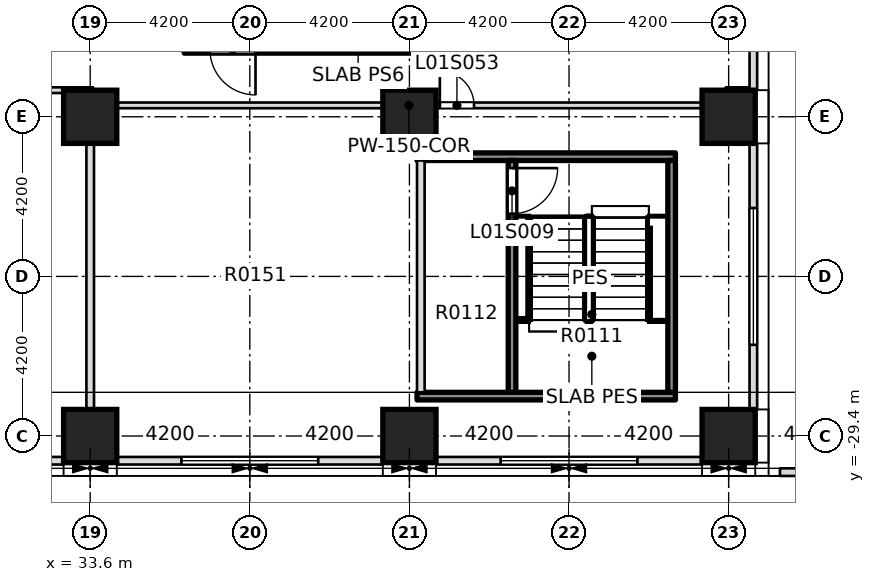
"""IFC4 building model, lengths in metres.
Left out: names, types, materials, properties, quantities, classifications, styles, units other than length and angle.
Written with IfcOpenShell. Run it as: python <this file> out.ifc"""

import sys

from ifc_helpers import new_model, si_unit, direction, frame, frame_2d, origin, origin_2d, place, context, subcontext, project, spatial, rectangle, extrude, element, fill, save


model = new_model("IFC4")
c1 = context("Model", 3, precision=1e-05, world=origin(), true_north=direction((0.0, 1.0)))
c2 = subcontext(c1, "Body", "Model", "MODEL_VIEW")
j1 = project(units=[si_unit("LENGTHUNIT", "METRE"), si_unit("PLANEANGLEUNIT", "RADIAN")], contexts=[c1])
p1 = place(None, origin())
s1 = spatial("IfcSite", under=j1, at=p1, CompositionType="ELEMENT")
p2 = place(p1, origin())
s2 = spatial("IfcBuilding", under=s1, at=p2, CompositionType="ELEMENT")
p3 = place(p2, frame((0.0, 0.0, 7.5)))
s3 = spatial("IfcBuildingStorey", under=s2, at=p3, CompositionType="ELEMENT", Elevation=7.5)
for number, where, z_axis, x_axis in (
    (1, (33.6, -29.4, 0.0), (0.0, 0.0, 1.0), (1.0, 0.0, 0.0)),
    (2, (42.0, -29.4, 0.0), (0.0, 0.0, 1.0), (1.0, 0.0, 0.0)),
):
    element("IfcColumn", number, at=place(p3, frame(where, z_axis=z_axis, x_axis=x_axis)), inside=s3, PredefinedType="COLUMN", context=c2, shape_type="SweptSolid", body=[
        extrude(rectangle(XDim=1.4, YDim=1.4, at=origin_2d()), origin(), (0.0, 0.0, 1.0), 4.6),
    ])
p4 = place(p3, frame((50.4, -29.4, 0.0), z_axis=(0.0, 0.0, 1.0), x_axis=(1.0, 0.0, 0.0)))
e3 = element("IfcColumn", 3, at=p4, inside=s3, PredefinedType="COLUMN", context=c2, shape_type="SweptSolid", body=[
    extrude(rectangle(XDim=1.4, YDim=1.4, at=origin_2d()), origin(), (0.0, 0.0, 1.0), 5.0),
])
for number, where, z_axis, x_axis in (
    (4, (33.6, -21.0, 0.0), (0.0, 0.0, 1.0), (1.0, 0.0, 0.0)),
    (5, (42.0, -21.0, 0.0), (0.0, 0.0, 1.0), (1.0, 0.0, 0.0)),
):
    element("IfcColumn", number, at=place(p3, frame(where, z_axis=z_axis, x_axis=x_axis)), inside=s3, PredefinedType="COLUMN", context=c2, shape_type="SweptSolid", body=[
        extrude(rectangle(XDim=1.4, YDim=1.4, at=origin_2d()), origin(), (0.0, 0.0, 1.0), 4.6),
    ])
p5 = place(p3, frame((50.4, -21.0, 0.0), z_axis=(0.0, 0.0, 1.0), x_axis=(1.0, 0.0, 0.0)))
e6 = element("IfcColumn", 6, at=p5, inside=s3, PredefinedType="COLUMN", context=c2, shape_type="SweptSolid", body=[
    extrude(rectangle(XDim=1.4, YDim=1.4, at=origin_2d()), origin(), (0.0, 0.0, 1.0), 5.0),
])
p6 = place(p3, frame((51.75, -30.35, 5.0), z_axis=(0.0, 0.0, 1.0), x_axis=(1.0, 0.0, 0.0)))
e7 = element("IfcWall", 7, at=p6, inside=s3, PredefinedType="PARAPET", context=c2, shape_type="SweptSolid", body=[
    extrude(rectangle(XDim=7.75, YDim=0.2, at=frame_2d((3.875, 0.0))), origin(), (0.0, 0.0, 1.0), 1.2),
])
for number, where, z_axis, x_axis in (
    (8, (42.2, -28.35, 0.0), (0.0, 0.0, 1.0), (1.0, 0.0, 0.0)),
    (9, (42.2, -22.05, 0.0), (0.0, 0.0, 1.0), (1.0, 0.0, 0.0)),
):
    element("IfcWall", number, at=place(p3, frame(where, z_axis=z_axis, x_axis=x_axis)), inside=s3, PredefinedType="SOLIDWALL", context=c2, shape_type="SweptSolid", body=[
        extrude(rectangle(XDim=6.8, YDim=0.2, at=frame_2d((3.4, 0.0))), origin(), (0.0, 0.0, 1.0), 4.6),
    ])
p7 = place(p3, frame((33.5, -20.7, 0.0), z_axis=(0.0, 0.0, 1.0), x_axis=(1.0, 0.0, 0.0)))
e10 = element("IfcWall", 10, at=p7, inside=s3, PredefinedType="PARTITIONING", context=c2, shape_type="SweptSolid", body=[
    extrude(rectangle(XDim=16.975, YDim=0.15, at=frame_2d((8.488, 0.0))), origin(), (0.0, 0.0, 1.0), 4.6),
])
p8 = place(p7, frame((9.3, 0.0, 0.0)))
e11 = element("IfcOpeningElement", 11, at=p8, cuts=e10, PredefinedType="OPENING", context=c2, shape_type="SweptSolid", body=[
    extrude(rectangle(XDim=0.9, YDim=2.1, at=frame_2d((0.45, 1.05))), frame((0.0, 0.085, 0.0), z_axis=(0.0, -1.0, 0.0), x_axis=(1.0, 0.0, 0.0)), (0.0, 0.0, 1.0), 0.17),
])
p9 = place(p3, frame((-34.15, -20.3, 0.0), z_axis=(0.0, 0.0, 1.0), x_axis=(1.0, 0.0, 0.0)))
e12 = element("IfcWall", 12, at=p9, inside=s3, PredefinedType="PARTITIONING", context=c2, shape_type="SweptSolid", body=[
    extrude(rectangle(XDim=67.825, YDim=0.15, at=frame_2d((33.913, 0.0))), origin(), (0.0, 0.0, 1.0), 4.6),
])
p10 = place(p9, frame((12.6, 0.0, 0.0)))
e13 = element("IfcOpeningElement", 13, at=p10, cuts=e12, PredefinedType="OPENING", context=c2, shape_type="SweptSolid", body=[
    extrude(rectangle(XDim=1.1, YDim=2.1, at=frame_2d((0.55, 1.05))), frame((0.0, 0.085, 0.0), z_axis=(0.0, -1.0, 0.0), x_axis=(1.0, 0.0, 0.0)), (0.0, 0.0, 1.0), 0.17),
])
p11 = place(p9, frame((4.025, 0.0, 0.0)))
e14 = element("IfcOpeningElement", 14, at=p11, cuts=e12, PredefinedType="OPENING", context=c2, shape_type="SweptSolid", body=[
    extrude(rectangle(XDim=0.9, YDim=2.1, at=frame_2d((0.45, 1.05))), frame((0.0, 0.085, 0.0), z_axis=(0.0, -1.0, 0.0), x_axis=(1.0, 0.0, 0.0)), (0.0, 0.0, 1.0), 0.17),
])
p12 = place(p9, frame((26.5, 0.0, 0.0)))
e15 = element("IfcOpeningElement", 15, at=p12, cuts=e12, PredefinedType="OPENING", context=c2, shape_type="SweptSolid", body=[
    extrude(rectangle(XDim=0.9, YDim=2.1, at=frame_2d((0.45, 1.05))), frame((0.0, 0.085, 0.0), z_axis=(0.0, -1.0, 0.0), x_axis=(1.0, 0.0, 0.0)), (0.0, 0.0, 1.0), 0.17),
])
p13 = place(p9, frame((40.85, 0.0, 0.0)))
e16 = element("IfcOpeningElement", 16, at=p13, cuts=e12, PredefinedType="OPENING", context=c2, shape_type="SweptSolid", body=[
    extrude(rectangle(XDim=0.9, YDim=2.1, at=frame_2d((0.45, 1.05))), frame((0.0, 0.085, 0.0), z_axis=(0.0, -1.0, 0.0), x_axis=(1.0, 0.0, 0.0)), (0.0, 0.0, 1.0), 0.17),
])
p14 = place(p9, frame((54.6, 0.0, 0.0)))
e17 = element("IfcOpeningElement", 17, at=p14, cuts=e12, PredefinedType="OPENING", context=c2, shape_type="SweptSolid", body=[
    extrude(rectangle(XDim=1.1, YDim=2.1, at=frame_2d((0.55, 1.05))), frame((0.0, 0.085, 0.0), z_axis=(0.0, -1.0, 0.0), x_axis=(1.0, 0.0, 0.0)), (0.0, 0.0, 1.0), 0.17),
])
p15 = place(p9, frame((63.1, 0.0, 0.0)))
e18 = element("IfcOpeningElement", 18, at=p15, cuts=e12, PredefinedType="OPENING", context=c2, shape_type="SweptSolid", body=[
    extrude(rectangle(XDim=0.9, YDim=2.1, at=frame_2d((0.45, 1.05))), frame((0.0, 0.085, 0.0), z_axis=(0.0, -1.0, 0.0), x_axis=(1.0, 0.0, 0.0)), (0.0, 0.0, 1.0), 0.17),
])
p16 = place(p3, frame((50.325, -20.3, 0.0), z_axis=(0.0, 0.0, 1.0), x_axis=(1.0, 0.0, 0.0)))
e19 = element("IfcWall", 19, at=p16, inside=s3, PredefinedType="PARTITIONING", context=c2, shape_type="SweptSolid", body=[
    extrude(rectangle(XDim=0.625, YDim=0.15, at=frame_2d((0.312, 0.0))), origin(), (0.0, 0.0, 1.0), 4.6),
])
p17 = place(p3, frame((36.075, -19.225, 0.0), z_axis=(0.0, 0.0, 1.0), x_axis=(1.0, 0.0, 0.0)))
e20 = element("IfcWall", 20, at=p17, inside=s3, PredefinedType="SOLIDWALL", context=c2, shape_type="SweptSolid", body=[
    extrude(rectangle(XDim=6.75, YDim=0.2, at=frame_2d((3.375, 0.0))), origin(), (0.0, 0.0, 1.0), 4.6),
])
p18 = place(p17, frame((0.675, 0.0, 0.0)))
e21 = element("IfcOpeningElement", 21, at=p18, cuts=e20, PredefinedType="OPENING", context=c2, shape_type="SweptSolid", body=[
    extrude(rectangle(XDim=1.2, YDim=2.1, at=frame_2d((0.6, 1.05))), frame((0.0, 0.11, 0.0), z_axis=(0.0, -1.0, 0.0), x_axis=(1.0, 0.0, 0.0)), (0.0, 0.0, 1.0), 0.22),
])
p19 = place(p3, frame((33.6, -29.95, 0.0), z_axis=(0.0, 0.0, 1.0), x_axis=(0.0, 1.0, 0.0)))
e22 = element("IfcWall", 22, at=p19, inside=s3, PredefinedType="PARTITIONING", context=c2, shape_type="SweptSolid", body=[
    extrude(rectangle(XDim=9.175, YDim=0.2, at=frame_2d((4.587, 0.0))), origin(), (0.0, 0.0, 1.0), 4.6),
])
p20 = place(p3, frame((33.6, -20.625, 0.0), z_axis=(0.0, 0.0, 1.0), x_axis=(0.0, 1.0, 0.0)))
e23 = element("IfcWall", 23, at=p20, inside=s3, PredefinedType="PARTITIONING", context=c2, shape_type="SweptSolid", body=[
    extrude(rectangle(XDim=0.25, YDim=0.15, at=frame_2d((0.125, 0.0))), origin(), (0.0, 0.0, 1.0), 4.6),
])
p21 = place(p3, frame((42.3, -28.25, 0.0), z_axis=(0.0, 0.0, 1.0), x_axis=(0.0, 1.0, 0.0)))
e24 = element("IfcWall", 24, at=p21, inside=s3, PredefinedType="PARTITIONING", context=c2, shape_type="SweptSolid", body=[
    extrude(rectangle(XDim=6.1, YDim=0.2, at=frame_2d((3.05, 0.0))), origin(), (0.0, 0.0, 1.0), 4.6),
])
p22 = place(p3, frame((44.7, -28.25, 0.0), z_axis=(0.0, 0.0, 1.0), x_axis=(0.0, 1.0, 0.0)))
e25 = element("IfcWall", 25, at=p22, inside=s3, PredefinedType="SOLIDWALL", context=c2, shape_type="SweptSolid", body=[
    extrude(rectangle(XDim=6.1, YDim=0.2, at=frame_2d((3.05, 0.0))), origin(), (0.0, 0.0, 1.0), 4.6),
])
p23 = place(p22, frame((4.7, 0.0, 0.0)))
e26 = element("IfcOpeningElement", 26, at=p23, cuts=e25, PredefinedType="OPENING", context=c2, shape_type="SweptSolid", body=[
    extrude(rectangle(XDim=1.2, YDim=2.1, at=frame_2d((0.6, 1.05))), frame((0.0, 0.11, 0.0), z_axis=(0.0, -1.0, 0.0), x_axis=(1.0, 0.0, 0.0)), (0.0, 0.0, 1.0), 0.22),
])
p24 = place(p3, frame((48.9, -28.25, 0.0), z_axis=(0.0, 0.0, 1.0), x_axis=(0.0, 1.0, 0.0)))
e27 = element("IfcWall", 27, at=p24, inside=s3, PredefinedType="SOLIDWALL", context=c2, shape_type="SweptSolid", body=[
    extrude(rectangle(XDim=6.1, YDim=0.2, at=frame_2d((3.05, 0.0))), origin(), (0.0, 0.0, 1.0), 4.6),
])
p25 = place(p3, frame((50.4, -20.625, 0.0), z_axis=(0.0, 0.0, 1.0), x_axis=(0.0, 1.0, 0.0)))
e28 = element("IfcWall", 28, at=p25, inside=s3, PredefinedType="PARTITIONING", context=c2, shape_type="SweptSolid", body=[
    extrude(rectangle(XDim=0.25, YDim=0.15, at=frame_2d((0.125, 0.0))), origin(), (0.0, 0.0, 1.0), 4.6),
])
p26 = place(p3, frame((25.9, -30.05, 0.0), z_axis=(0.0, 0.0, 1.0), x_axis=(1.0, 0.0, 0.0)))
e29 = element("IfcWall", 29, at=p26, inside=s3, PredefinedType="STANDARD", context=c2, shape_type="SweptSolid", body=[
    extrude(rectangle(XDim=7.0, YDim=0.2, at=frame_2d((3.5, 0.0))), origin(), (0.0, 0.0, 1.0), 4.6),
])
p27 = place(p26, frame((1.7, 0.0, 0.9)))
e30 = element("IfcOpeningElement", 30, at=p27, cuts=e29, PredefinedType="OPENING", context=c2, shape_type="SweptSolid", body=[
    extrude(rectangle(XDim=3.6, YDim=2.8, at=frame_2d((1.8, 1.4))), frame((0.0, 0.11, 0.0), z_axis=(0.0, -1.0, 0.0), x_axis=(1.0, 0.0, 0.0)), (0.0, 0.0, 1.0), 0.22),
])
p28 = place(p3, frame((34.3, -30.05, 0.0), z_axis=(0.0, 0.0, 1.0), x_axis=(1.0, 0.0, 0.0)))
e31 = element("IfcWall", 31, at=p28, inside=s3, PredefinedType="STANDARD", context=c2, shape_type="SweptSolid", body=[
    extrude(rectangle(XDim=7.0, YDim=0.2, at=frame_2d((3.5, 0.0))), origin(), (0.0, 0.0, 1.0), 4.6),
])
p29 = place(p28, frame((1.7, 0.0, 0.9)))
e32 = element("IfcOpeningElement", 32, at=p29, cuts=e31, PredefinedType="OPENING", context=c2, shape_type="SweptSolid", body=[
    extrude(rectangle(XDim=3.6, YDim=2.8, at=frame_2d((1.8, 1.4))), frame((0.0, 0.11, 0.0), z_axis=(0.0, -1.0, 0.0), x_axis=(1.0, 0.0, 0.0)), (0.0, 0.0, 1.0), 0.22),
])
p30 = place(p3, frame((42.7, -30.05, 0.0), z_axis=(0.0, 0.0, 1.0), x_axis=(1.0, 0.0, 0.0)))
e33 = element("IfcWall", 33, at=p30, inside=s3, PredefinedType="STANDARD", context=c2, shape_type="SweptSolid", body=[
    extrude(rectangle(XDim=7.0, YDim=0.2, at=frame_2d((3.5, 0.0))), origin(), (0.0, 0.0, 1.0), 4.6),
])
p31 = place(p30, frame((1.7, 0.0, 0.9)))
e34 = element("IfcOpeningElement", 34, at=p31, cuts=e33, PredefinedType="OPENING", context=c2, shape_type="SweptSolid", body=[
    extrude(rectangle(XDim=3.6, YDim=2.8, at=frame_2d((1.8, 1.4))), frame((0.0, 0.11, 0.0), z_axis=(0.0, -1.0, 0.0), x_axis=(1.0, 0.0, 0.0)), (0.0, 0.0, 1.0), 0.22),
])
p32 = place(p3, frame((51.05, -28.7, 0.0), z_axis=(0.0, 0.0, 1.0), x_axis=(0.0, 1.0, 0.0)))
e35 = element("IfcWall", 35, at=p32, inside=s3, PredefinedType="STANDARD", context=c2, shape_type="SweptSolid", body=[
    extrude(rectangle(XDim=7.0, YDim=0.2, at=frame_2d((3.5, 0.0))), origin(), (0.0, 0.0, 1.0), 4.6),
])
p33 = place(p32, frame((1.7, 0.0, 0.9)))
e36 = element("IfcOpeningElement", 36, at=p33, cuts=e35, PredefinedType="OPENING", context=c2, shape_type="SweptSolid", body=[
    extrude(rectangle(XDim=3.6, YDim=2.8, at=frame_2d((1.8, 1.4))), frame((0.0, 0.11, 0.0), z_axis=(0.0, -1.0, 0.0), x_axis=(1.0, 0.0, 0.0)), (0.0, 0.0, 1.0), 0.22),
])
p34 = place(p3, frame((51.05, -20.3, 0.0), z_axis=(0.0, 0.0, 1.0), x_axis=(0.0, 1.0, 0.0)))
e37 = element("IfcWall", 37, at=p34, inside=s3, PredefinedType="STANDARD", context=c2, shape_type="SweptSolid", body=[
    extrude(rectangle(XDim=7.0, YDim=0.2, at=frame_2d((3.5, 0.0))), origin(), (0.0, 0.0, 1.0), 4.6),
])
p35 = place(p34, frame((2.32, 0.0, 0.9)))
e38 = element("IfcOpeningElement", 38, at=p35, cuts=e37, PredefinedType="OPENING", context=c2, shape_type="SweptSolid", body=[
    extrude(rectangle(XDim=3.6, YDim=2.8, at=frame_2d((1.8, 1.4))), frame((0.0, 0.11, 0.0), z_axis=(0.0, -1.0, 0.0), x_axis=(1.0, 0.0, 0.0)), (0.0, 0.0, 1.0), 0.22),
])
p36 = place(p23, origin())
e39 = element("IfcDoor", 39, at=p36, inside=s3, OperationType="DOUBLE_DOOR_SINGLE_SWING", PredefinedType="DOOR", context=c2, shape_type="SweptSolid", body=[
    extrude(rectangle(XDim=1.2, YDim=2.1, at=frame_2d((0.6, 1.05))), frame((0.0, 0.025, 0.0), z_axis=(0.0, -1.0, 0.0), x_axis=(1.0, 0.0, 0.0)), (0.0, 0.0, 1.0), 0.05),
])
fill(e26, e39)
p37 = place(p8, origin())
e40 = element("IfcDoor", 40, at=p37, inside=s3, OperationType="SINGLE_SWING_RIGHT", PredefinedType="DOOR", context=c2, shape_type="SweptSolid", body=[
    extrude(rectangle(XDim=0.9, YDim=2.1, at=frame_2d((0.45, 1.05))), frame((0.0, 0.025, 0.0), z_axis=(0.0, -1.0, 0.0), x_axis=(1.0, 0.0, 0.0)), (0.0, 0.0, 1.0), 0.05),
])
fill(e11, e40)
p38 = place(p29, origin())
e41 = element("IfcWindow", 41, at=p38, inside=s3, PartitioningType="SINGLE_PANEL", PredefinedType="WINDOW", context=c2, shape_type="SweptSolid", body=[
    extrude(rectangle(XDim=3.6, YDim=2.8, at=frame_2d((1.8, 1.4))), frame((0.0, 0.03, 0.0), z_axis=(0.0, -1.0, 0.0), x_axis=(1.0, 0.0, 0.0)), (0.0, 0.0, 1.0), 0.06),
])
fill(e32, e41)
p39 = place(p31, origin())
e42 = element("IfcWindow", 42, at=p39, inside=s3, PartitioningType="SINGLE_PANEL", PredefinedType="WINDOW", context=c2, shape_type="SweptSolid", body=[
    extrude(rectangle(XDim=3.6, YDim=2.8, at=frame_2d((1.8, 1.4))), frame((0.0, 0.03, 0.0), z_axis=(0.0, -1.0, 0.0), x_axis=(1.0, 0.0, 0.0)), (0.0, 0.0, 1.0), 0.06),
])
fill(e34, e42)
p40 = place(p33, origin())
e43 = element("IfcWindow", 43, at=p40, inside=s3, PartitioningType="SINGLE_PANEL", PredefinedType="WINDOW", context=c2, shape_type="SweptSolid", body=[
    extrude(rectangle(XDim=3.6, YDim=2.8, at=frame_2d((1.8, 1.4))), frame((0.0, 0.03, 0.0), z_axis=(0.0, -1.0, 0.0), x_axis=(1.0, 0.0, 0.0)), (0.0, 0.0, 1.0), 0.06),
])
fill(e36, e43)
save(model, sys.argv[1])
